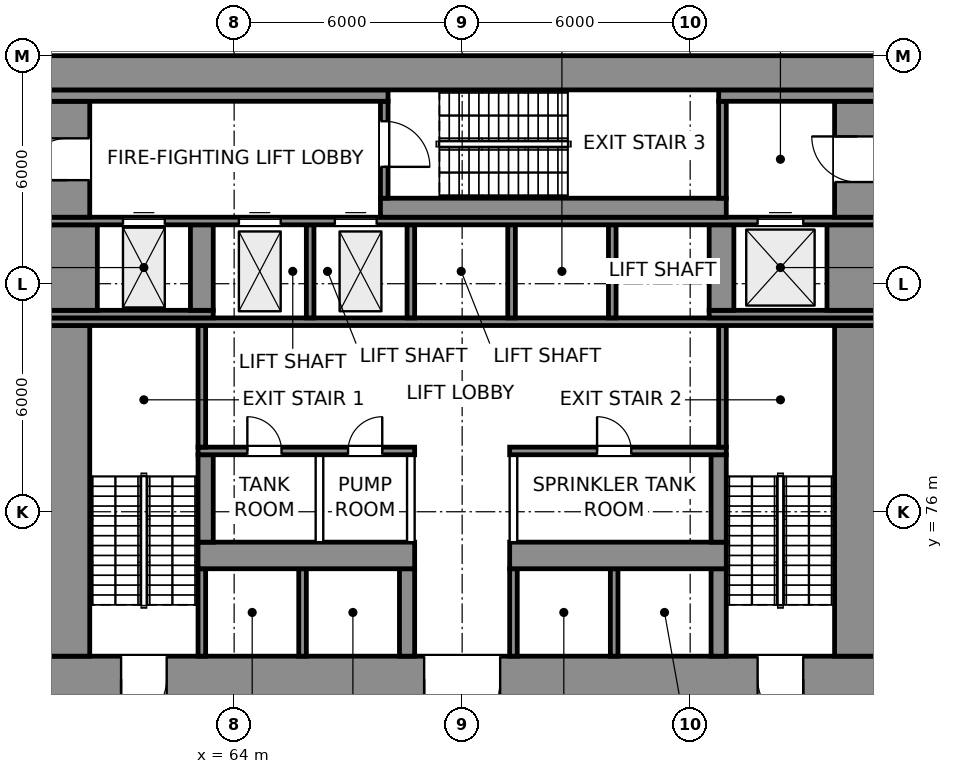
"""IFC4 building model, lengths in metres.
Left out: names, types, materials, properties, quantities, classifications, styles, units other than length and angle.
Written with IfcOpenShell. Run it as: python <this file> out.ifc"""

import sys

from ifc_helpers import new_model, si_unit, direction, frame, frame_2d, origin, place, context, subcontext, project, spatial, rectangle, extrude, element, fill, save


model = new_model("IFC4")
c1 = context("Model", 3, precision=1e-05, world=origin(), true_north=direction((0.0, 1.0)))
c2 = subcontext(c1, "Body", "Model", "MODEL_VIEW")
j1 = project(units=[si_unit("LENGTHUNIT", "METRE"), si_unit("PLANEANGLEUNIT", "RADIAN")], contexts=[c1])
p1 = place(None, origin())
s1 = spatial("IfcSite", under=j1, at=p1, CompositionType="ELEMENT")
p2 = place(p1, origin())
s2 = spatial("IfcBuilding", under=s1, at=p2, CompositionType="ELEMENT")
p3 = place(p2, frame((0.0, 0.0, -5.0)))
s3 = spatial("IfcBuildingStorey", under=s2, at=p3, CompositionType="ELEMENT", Elevation=-5.0)
p4 = place(p3, frame((59.0, 71.6, 0.0), z_axis=(0.0, 0.0, 1.0), x_axis=(1.0, 0.0, 0.0)))
e1 = element("IfcWall", 1, at=p4, inside=s3, PredefinedType="SHEAR", context=c2, shape_type="SweptSolid", body=[
    extrude(rectangle(XDim=22.0, YDim=1.2, at=frame_2d((11.0, 0.0))), origin(), (0.0, 0.0, 1.0), 5.0),
])
p5 = place(p4, frame((2.025, 0.0, 0.0)))
e2 = element("IfcOpeningElement", 2, at=p5, cuts=e1, PredefinedType="OPENING", context=c2, shape_type="SweptSolid", body=[
    extrude(rectangle(XDim=1.2, YDim=2.1, at=frame_2d((0.6, 1.05))), frame((0.0, 0.61, 0.0), z_axis=(0.0, -1.0, 0.0), x_axis=(1.0, 0.0, 0.0)), (0.0, 0.0, 1.0), 1.22),
])
p6 = place(p4, frame((18.775, 0.0, 0.0)))
e3 = element("IfcOpeningElement", 3, at=p6, cuts=e1, PredefinedType="OPENING", context=c2, shape_type="SweptSolid", body=[
    extrude(rectangle(XDim=1.2, YDim=2.1, at=frame_2d((0.6, 1.05))), frame((0.0, 0.61, 0.0), z_axis=(0.0, -1.0, 0.0), x_axis=(1.0, 0.0, 0.0)), (0.0, 0.0, 1.0), 1.22),
])
p7 = place(p4, frame((10.0, 0.0, 0.0)))
e4 = element("IfcOpeningElement", 4, at=p7, cuts=e1, PredefinedType="OPENING", context=c2, shape_type="SweptSolid", body=[
    extrude(rectangle(XDim=2.0, YDim=2.1, at=frame_2d((1.0, 1.05))), frame((0.0, 0.61, 0.0), z_axis=(0.0, -1.0, 0.0), x_axis=(1.0, 0.0, 0.0)), (0.0, 0.0, 1.0), 1.22),
])
p8 = place(p3, frame((59.6, 72.2, 0.0), z_axis=(0.0, 0.0, 1.0), x_axis=(0.0, 1.0, 0.0)))
e5 = element("IfcWall", 5, at=p8, inside=s3, PredefinedType="SHEAR", context=c2, shape_type="SweptSolid", body=[
    extrude(rectangle(XDim=8.7, YDim=1.2, at=frame_2d((4.35, 0.0))), origin(), (0.0, 0.0, 1.0), 5.0),
])
for number, where, z_axis, x_axis in (
    (6, (63.15, 72.2, 0.0), (0.0, 0.0, 1.0), (0.0, 1.0, 0.0)),
    (7, (65.8, 72.2, 0.0), (0.0, 0.0, 1.0), (0.0, 1.0, 0.0)),
):
    element("IfcWall", number, at=place(p3, frame(where, z_axis=z_axis, x_axis=x_axis)), inside=s3, PredefinedType="SHEAR", context=c2, shape_type="SweptSolid", body=[
        extrude(rectangle(XDim=2.3, YDim=0.2, at=frame_2d((1.15, 0.0))), origin(), (0.0, 0.0, 1.0), 5.0),
    ])
p9 = place(p3, frame((68.55, 72.2, 0.0), z_axis=(0.0, 0.0, 1.0), x_axis=(0.0, 1.0, 0.0)))
e8 = element("IfcWall", 8, at=p9, inside=s3, PredefinedType="SHEAR", context=c2, shape_type="SweptSolid", body=[
    extrude(rectangle(XDim=2.3, YDim=0.4, at=frame_2d((1.15, 0.0))), origin(), (0.0, 0.0, 1.0), 5.0),
])
for number, where, z_axis, x_axis in (
    (9, (71.35, 72.2, 0.0), (0.0, 0.0, 1.0), (0.0, 1.0, 0.0)),
    (10, (74.0, 72.2, 0.0), (0.0, 0.0, 1.0), (0.0, 1.0, 0.0)),
):
    element("IfcWall", number, at=place(p3, frame(where, z_axis=z_axis, x_axis=x_axis)), inside=s3, PredefinedType="SHEAR", context=c2, shape_type="SweptSolid", body=[
        extrude(rectangle(XDim=2.3, YDim=0.2, at=frame_2d((1.15, 0.0))), origin(), (0.0, 0.0, 1.0), 5.0),
    ])
p10 = place(p3, frame((76.75, 72.2, 0.0), z_axis=(0.0, 0.0, 1.0), x_axis=(0.0, 1.0, 0.0)))
e11 = element("IfcWall", 11, at=p10, inside=s3, PredefinedType="SHEAR", context=c2, shape_type="SweptSolid", body=[
    extrude(rectangle(XDim=2.3, YDim=0.4, at=frame_2d((1.15, 0.0))), origin(), (0.0, 0.0, 1.0), 5.0),
])
p11 = place(p3, frame((80.4, 72.2, 0.0), z_axis=(0.0, 0.0, 1.0), x_axis=(0.0, 1.0, 0.0)))
e12 = element("IfcWall", 12, at=p11, inside=s3, PredefinedType="SHEAR", context=c2, shape_type="SweptSolid", body=[
    extrude(rectangle(XDim=8.7, YDim=1.2, at=frame_2d((4.35, 0.0))), origin(), (0.0, 0.0, 1.0), 5.0),
])
for number, where, z_axis, x_axis in (
    (13, (63.05, 74.85, 0.0), (0.0, 0.0, 1.0), (1.0, 0.0, 0.0)),
    (14, (71.25, 74.85, 0.0), (0.0, 0.0, 1.0), (1.0, 0.0, 0.0)),
):
    element("IfcWall", number, at=place(p3, frame(where, z_axis=z_axis, x_axis=x_axis)), inside=s3, PredefinedType="SHEAR", context=c2, shape_type="SweptSolid", body=[
        extrude(rectangle(XDim=5.7, YDim=0.7, at=frame_2d((2.85, 0.0))), origin(), (0.0, 0.0, 1.0), 5.0),
    ])
p12 = place(p3, frame((63.25, 75.2, 0.0), z_axis=(0.0, 0.0, 1.0), x_axis=(0.0, 1.0, 0.0)))
e15 = element("IfcWall", 15, at=p12, inside=s3, PredefinedType="SHEAR", context=c2, shape_type="SweptSolid", body=[
    extrude(rectangle(XDim=2.3, YDim=0.4, at=frame_2d((1.15, 0.0))), origin(), (0.0, 0.0, 1.0), 5.0),
])
for number, where, z_axis, x_axis in (
    (16, (66.245, 75.2, 0.0), (0.0, 0.0, 1.0), (0.0, 1.0, 0.0)),
    (17, (68.65, 75.2, 0.0), (0.0, 0.0, 1.0), (0.0, 1.0, 0.0)),
    (18, (71.35, 75.2, 0.0), (0.0, 0.0, 1.0), (0.0, 1.0, 0.0)),
):
    element("IfcWall", number, at=place(p3, frame(where, z_axis=z_axis, x_axis=x_axis)), inside=s3, PredefinedType="PARTITIONING", context=c2, shape_type="SweptSolid", body=[
        extrude(rectangle(XDim=2.3, YDim=0.2, at=frame_2d((1.15, 0.0))), origin(), (0.0, 0.0, 1.0), 4.55),
    ])
p13 = place(p3, frame((76.75, 75.2, 0.0), z_axis=(0.0, 0.0, 1.0), x_axis=(0.0, 1.0, 0.0)))
e19 = element("IfcWall", 19, at=p13, inside=s3, PredefinedType="SHEAR", context=c2, shape_type="SweptSolid", body=[
    extrude(rectangle(XDim=2.3, YDim=0.4, at=frame_2d((1.15, 0.0))), origin(), (0.0, 0.0, 1.0), 5.0),
])
p14 = place(p3, frame((63.05, 77.6, 0.0), z_axis=(0.0, 0.0, 1.0), x_axis=(1.0, 0.0, 0.0)))
e20 = element("IfcWall", 20, at=p14, inside=s3, PredefinedType="SHEAR", context=c2, shape_type="SweptSolid", body=[
    extrude(rectangle(XDim=5.7, YDim=0.2, at=frame_2d((2.85, 0.0))), origin(), (0.0, 0.0, 1.0), 5.0),
])
p15 = place(p14, frame((1.298, 0.0, 0.0)))
e21 = element("IfcOpeningElement", 21, at=p15, cuts=e20, PredefinedType="OPENING", context=c2, shape_type="SweptSolid", body=[
    extrude(rectangle(XDim=0.9, YDim=2.1, at=frame_2d((0.45, 1.05))), frame((0.0, 0.11, 0.0), z_axis=(0.0, -1.0, 0.0), x_axis=(1.0, 0.0, 0.0)), (0.0, 0.0, 1.0), 0.22),
])
p16 = place(p14, frame((3.948, 0.0, 0.0)))
e22 = element("IfcOpeningElement", 22, at=p16, cuts=e20, PredefinedType="OPENING", context=c2, shape_type="SweptSolid", body=[
    extrude(rectangle(XDim=0.9, YDim=2.1, at=frame_2d((0.45, 1.05))), frame((0.0, 0.11, 0.0), z_axis=(0.0, -1.0, 0.0), x_axis=(1.0, 0.0, 0.0)), (0.0, 0.0, 1.0), 0.22),
])
p17 = place(p3, frame((71.25, 77.6, 0.0), z_axis=(0.0, 0.0, 1.0), x_axis=(1.0, 0.0, 0.0)))
e23 = element("IfcWall", 23, at=p17, inside=s3, PredefinedType="SHEAR", context=c2, shape_type="SweptSolid", body=[
    extrude(rectangle(XDim=5.7, YDim=0.2, at=frame_2d((2.85, 0.0))), origin(), (0.0, 0.0, 1.0), 5.0),
])
p18 = place(p17, frame((2.3, 0.0, 0.0)))
e24 = element("IfcOpeningElement", 24, at=p18, cuts=e23, PredefinedType="OPENING", context=c2, shape_type="SweptSolid", body=[
    extrude(rectangle(XDim=0.9, YDim=2.1, at=frame_2d((0.45, 1.05))), frame((0.0, 0.11, 0.0), z_axis=(0.0, -1.0, 0.0), x_axis=(1.0, 0.0, 0.0)), (0.0, 0.0, 1.0), 0.22),
])
for number, where, z_axis, x_axis in (
    (25, (63.15, 77.7, 0.0), (0.0, 0.0, 1.0), (0.0, 1.0, 0.0)),
    (26, (76.85, 77.7, 0.0), (0.0, 0.0, 1.0), (0.0, 1.0, 0.0)),
):
    element("IfcWall", number, at=place(p3, frame(where, z_axis=z_axis, x_axis=x_axis)), inside=s3, PredefinedType="SHEAR", context=c2, shape_type="SweptSolid", body=[
        extrude(rectangle(XDim=3.2, YDim=0.2, at=frame_2d((1.6, 0.0))), origin(), (0.0, 0.0, 1.0), 5.0),
    ])
p19 = place(p3, frame((59.0, 81.0, 0.0), z_axis=(0.0, 0.0, 1.0), x_axis=(1.0, 0.0, 0.0)))
e27 = element("IfcWall", 27, at=p19, inside=s3, PredefinedType="SHEAR", context=c2, shape_type="SweptSolid", body=[
    extrude(rectangle(XDim=22.0, YDim=0.2, at=frame_2d((11.0, 0.0))), origin(), (0.0, 0.0, 1.0), 5.0),
])
p20 = place(p3, frame((59.0, 81.2, 0.0), z_axis=(0.0, 0.0, 1.0), x_axis=(1.0, 0.0, 0.0)))
e28 = element("IfcWall", 28, at=p20, inside=s3, PredefinedType="SHEAR", context=c2, shape_type="SweptSolid", body=[
    extrude(rectangle(XDim=4.45, YDim=0.2, at=frame_2d((2.225, 0.0))), origin(), (0.0, 0.0, 1.0), 5.0),
])
for number, where, z_axis, x_axis in (
    (29, (66.0, 81.1, 0.0), (0.0, 0.0, 1.0), (0.0, 1.0, 0.0)),
    (30, (68.65, 81.1, 0.0), (0.0, 0.0, 1.0), (0.0, 1.0, 0.0)),
    (31, (71.3, 81.1, 0.0), (0.0, 0.0, 1.0), (0.0, 1.0, 0.0)),
    (32, (73.95, 81.1, 0.0), (0.0, 0.0, 1.0), (0.0, 1.0, 0.0)),
):
    element("IfcWall", number, at=place(p3, frame(where, z_axis=z_axis, x_axis=x_axis)), inside=s3, PredefinedType="SHEAR", context=c2, shape_type="SweptSolid", body=[
        extrude(rectangle(XDim=2.45, YDim=0.2, at=frame_2d((1.225, 0.0))), origin(), (0.0, 0.0, 1.0), 5.0),
    ])
p21 = place(p3, frame((76.5, 81.2, 0.0), z_axis=(0.0, 0.0, 1.0), x_axis=(1.0, 0.0, 0.0)))
e33 = element("IfcWall", 33, at=p21, inside=s3, PredefinedType="SHEAR", context=c2, shape_type="SweptSolid", body=[
    extrude(rectangle(XDim=4.5, YDim=0.2, at=frame_2d((2.25, 0.0))), origin(), (0.0, 0.0, 1.0), 5.0),
])
p22 = place(p3, frame((59.7, 81.3, 0.0), z_axis=(0.0, 0.0, 1.0), x_axis=(0.0, 1.0, 0.0)))
e34 = element("IfcWall", 34, at=p22, inside=s3, PredefinedType="SHEAR", context=c2, shape_type="SweptSolid", body=[
    extrude(rectangle(XDim=2.25, YDim=1.4, at=frame_2d((1.125, 0.0))), origin(), (0.0, 0.0, 1.0), 5.0),
])
p23 = place(p3, frame((63.15, 81.3, 0.0), z_axis=(0.0, 0.0, 1.0), x_axis=(0.0, 1.0, 0.0)))
e35 = element("IfcWall", 35, at=p23, inside=s3, PredefinedType="SHEAR", context=c2, shape_type="SweptSolid", body=[
    extrude(rectangle(XDim=2.25, YDim=0.6, at=frame_2d((1.125, 0.0))), origin(), (0.0, 0.0, 1.0), 5.0),
])
p24 = place(p3, frame((76.825, 81.3, 0.0), z_axis=(0.0, 0.0, 1.0), x_axis=(0.0, 1.0, 0.0)))
e36 = element("IfcWall", 36, at=p24, inside=s3, PredefinedType="SHEAR", context=c2, shape_type="SweptSolid", body=[
    extrude(rectangle(XDim=2.25, YDim=0.65, at=frame_2d((1.125, 0.0))), origin(), (0.0, 0.0, 1.0), 5.0),
])
p25 = place(p3, frame((80.3, 81.3, 0.0), z_axis=(0.0, 0.0, 1.0), x_axis=(0.0, 1.0, 0.0)))
e37 = element("IfcWall", 37, at=p25, inside=s3, PredefinedType="SHEAR", context=c2, shape_type="SweptSolid", body=[
    extrude(rectangle(XDim=2.25, YDim=1.4, at=frame_2d((1.125, 0.0))), origin(), (0.0, 0.0, 1.0), 5.0),
])
p26 = place(p3, frame((59.0, 83.65, 0.0), z_axis=(0.0, 0.0, 1.0), x_axis=(1.0, 0.0, 0.0)))
e38 = element("IfcWall", 38, at=p26, inside=s3, PredefinedType="SHEAR", context=c2, shape_type="SweptSolid", body=[
    extrude(rectangle(XDim=22.0, YDim=0.2, at=frame_2d((11.0, 0.0))), origin(), (0.0, 0.0, 1.0), 5.0),
])
p27 = place(p26, frame((5.125, 0.0, 0.0)))
e39 = element("IfcOpeningElement", 39, at=p27, cuts=e38, PredefinedType="OPENING", context=c2, shape_type="SweptSolid", body=[
    extrude(rectangle(XDim=1.1, YDim=2.1, at=frame_2d((0.55, 1.05))), frame((0.0, 0.11, 0.0), z_axis=(0.0, -1.0, 0.0), x_axis=(1.0, 0.0, 0.0)), (0.0, 0.0, 1.0), 0.22),
])
p28 = place(p26, frame((7.65, 0.0, 0.0)))
e40 = element("IfcOpeningElement", 40, at=p28, cuts=e38, PredefinedType="OPENING", context=c2, shape_type="SweptSolid", body=[
    extrude(rectangle(XDim=1.1, YDim=2.1, at=frame_2d((0.55, 1.05))), frame((0.0, 0.11, 0.0), z_axis=(0.0, -1.0, 0.0), x_axis=(1.0, 0.0, 0.0)), (0.0, 0.0, 1.0), 0.22),
])
p29 = place(p26, frame((18.775, 0.0, 0.0)))
e41 = element("IfcOpeningElement", 41, at=p29, cuts=e38, PredefinedType="OPENING", context=c2, shape_type="SweptSolid", body=[
    extrude(rectangle(XDim=1.2, YDim=2.1, at=frame_2d((0.6, 1.05))), frame((0.0, 0.11, 0.0), z_axis=(0.0, -1.0, 0.0), x_axis=(1.0, 0.0, 0.0)), (0.0, 0.0, 1.0), 0.22),
])
p30 = place(p26, frame((2.075, 0.0, 0.0)))
e42 = element("IfcOpeningElement", 42, at=p30, cuts=e38, PredefinedType="OPENING", context=c2, shape_type="SweptSolid", body=[
    extrude(rectangle(XDim=1.1, YDim=2.1, at=frame_2d((0.55, 1.05))), frame((0.0, 0.11, 0.0), z_axis=(0.0, -1.0, 0.0), x_axis=(1.0, 0.0, 0.0)), (0.0, 0.0, 1.0), 0.22),
])
p31 = place(p3, frame((59.6, 83.75, 0.0), z_axis=(0.0, 0.0, 1.0), x_axis=(0.0, 1.0, 0.0)))
e43 = element("IfcWall", 43, at=p31, inside=s3, PredefinedType="SHEAR", context=c2, shape_type="SweptSolid", body=[
    extrude(rectangle(XDim=3.05, YDim=1.2, at=frame_2d((1.525, 0.0))), origin(), (0.0, 0.0, 1.0), 5.0),
])
p32 = place(p31, frame((0.975, 0.0, 0.0)))
e44 = element("IfcOpeningElement", 44, at=p32, cuts=e43, PredefinedType="OPENING", context=c2, shape_type="SweptSolid", body=[
    extrude(rectangle(XDim=1.1, YDim=2.1, at=frame_2d((0.55, 1.05))), frame((0.0, 0.61, 0.0), z_axis=(0.0, -1.0, 0.0), x_axis=(1.0, 0.0, 0.0)), (0.0, 0.0, 1.0), 1.22),
])
p33 = place(p3, frame((67.85, 84.0, 0.0), z_axis=(0.0, 0.0, 1.0), x_axis=(1.0, 0.0, 0.0)))
e45 = element("IfcWall", 45, at=p33, inside=s3, PredefinedType="SHEAR", context=c2, shape_type="SweptSolid", body=[
    extrude(rectangle(XDim=9.1, YDim=0.5, at=frame_2d((4.55, 0.0))), origin(), (0.0, 0.0, 1.0), 5.0),
])
p34 = place(p3, frame((80.4, 83.75, 0.0), z_axis=(0.0, 0.0, 1.0), x_axis=(0.0, 1.0, 0.0)))
e46 = element("IfcWall", 46, at=p34, inside=s3, PredefinedType="SHEAR", context=c2, shape_type="SweptSolid", body=[
    extrude(rectangle(XDim=3.05, YDim=1.2, at=frame_2d((1.525, 0.0))), origin(), (0.0, 0.0, 1.0), 5.0),
])
p35 = place(p34, frame((0.925, 0.0, 0.0)))
e47 = element("IfcOpeningElement", 47, at=p35, cuts=e46, PredefinedType="OPENING", context=c2, shape_type="SweptSolid", body=[
    extrude(rectangle(XDim=1.2, YDim=2.1, at=frame_2d((0.6, 1.05))), frame((0.0, 0.61, 0.0), z_axis=(0.0, -1.0, 0.0), x_axis=(1.0, 0.0, 0.0)), (0.0, 0.0, 1.0), 1.22),
])
p36 = place(p3, frame((67.95, 84.25, 0.0), z_axis=(0.0, 0.0, 1.0), x_axis=(0.0, 1.0, 0.0)))
e48 = element("IfcWall", 48, at=p36, inside=s3, PredefinedType="SHEAR", context=c2, shape_type="SweptSolid", body=[
    extrude(rectangle(XDim=2.55, YDim=0.2, at=frame_2d((1.275, 0.0))), origin(), (0.0, 0.0, 1.0), 5.0),
])
p37 = place(p36, frame((0.825, 0.0, 0.0)))
e49 = element("IfcOpeningElement", 49, at=p37, cuts=e48, PredefinedType="OPENING", context=c2, shape_type="SweptSolid", body=[
    extrude(rectangle(XDim=1.2, YDim=2.1, at=frame_2d((0.6, 1.05))), frame((0.0, 0.11, 0.0), z_axis=(0.0, -1.0, 0.0), x_axis=(1.0, 0.0, 0.0)), (0.0, 0.0, 1.0), 0.22),
])
p38 = place(p3, frame((76.85, 84.25, 0.0), z_axis=(0.0, 0.0, 1.0), x_axis=(0.0, 1.0, 0.0)))
e50 = element("IfcWall", 50, at=p38, inside=s3, PredefinedType="SHEAR", context=c2, shape_type="SweptSolid", body=[
    extrude(rectangle(XDim=2.55, YDim=0.2, at=frame_2d((1.275, 0.0))), origin(), (0.0, 0.0, 1.0), 5.0),
])
p39 = place(p3, frame((59.0, 86.95, 0.0), z_axis=(0.0, 0.0, 1.0), x_axis=(1.0, 0.0, 0.0)))
e51 = element("IfcWall", 51, at=p39, inside=s3, PredefinedType="SHEAR", context=c2, shape_type="SweptSolid", body=[
    extrude(rectangle(XDim=9.05, YDim=0.3, at=frame_2d((4.525, 0.0))), origin(), (0.0, 0.0, 1.0), 5.0),
])
p40 = place(p3, frame((76.75, 86.95, 0.0), z_axis=(0.0, 0.0, 1.0), x_axis=(1.0, 0.0, 0.0)))
e52 = element("IfcWall", 52, at=p40, inside=s3, PredefinedType="SHEAR", context=c2, shape_type="SweptSolid", body=[
    extrude(rectangle(XDim=4.25, YDim=0.3, at=frame_2d((2.125, 0.0))), origin(), (0.0, 0.0, 1.0), 5.0),
])
p41 = place(p3, frame((59.0, 87.55, 0.0), z_axis=(0.0, 0.0, 1.0), x_axis=(1.0, 0.0, 0.0)))
e53 = element("IfcWall", 53, at=p41, inside=s3, PredefinedType="SHEAR", context=c2, shape_type="SweptSolid", body=[
    extrude(rectangle(XDim=22.0, YDim=0.9, at=frame_2d((11.0, 0.0))), origin(), (0.0, 0.0, 1.0), 5.0),
])
p42 = place(p5, frame((1.2, 0.0, 0.0), z_axis=(0.0, 0.0, 1.0), x_axis=(-1.0, 0.0, 0.0)))
e54 = element("IfcDoor", 54, at=p42, inside=s3, OperationType="SINGLE_SWING_RIGHT", PredefinedType="DOOR", context=c2, shape_type="SweptSolid", body=[
    extrude(rectangle(XDim=1.2, YDim=2.1, at=frame_2d((0.6, 1.05))), frame((0.0, 0.025, 0.0), z_axis=(0.0, -1.0, 0.0), x_axis=(1.0, 0.0, 0.0)), (0.0, 0.0, 1.0), 0.05),
])
fill(e2, e54)
p43 = place(p6, frame((1.2, 0.0, 0.0), z_axis=(0.0, 0.0, 1.0), x_axis=(-1.0, 0.0, 0.0)))
e55 = element("IfcDoor", 55, at=p43, inside=s3, OperationType="SINGLE_SWING_LEFT", PredefinedType="DOOR", context=c2, shape_type="SweptSolid", body=[
    extrude(rectangle(XDim=1.2, YDim=2.1, at=frame_2d((0.6, 1.05))), frame((0.0, 0.025, 0.0), z_axis=(0.0, -1.0, 0.0), x_axis=(1.0, 0.0, 0.0)), (0.0, 0.0, 1.0), 0.05),
])
fill(e3, e55)
p44 = place(p37, frame((1.2, 0.0, 0.0), z_axis=(0.0, 0.0, 1.0), x_axis=(-1.0, 0.0, 0.0)))
e56 = element("IfcDoor", 56, at=p44, inside=s3, OperationType="SINGLE_SWING_RIGHT", PredefinedType="DOOR", context=c2, shape_type="SweptSolid", body=[
    extrude(rectangle(XDim=1.2, YDim=2.1, at=frame_2d((0.6, 1.05))), frame((0.0, 0.025, 0.0), z_axis=(0.0, -1.0, 0.0), x_axis=(1.0, 0.0, 0.0)), (0.0, 0.0, 1.0), 0.05),
])
fill(e49, e56)
p45 = place(p7, frame((2.0, 0.0, 0.0), z_axis=(0.0, 0.0, 1.0), x_axis=(-1.0, 0.0, 0.0)))
e57 = element("IfcDoor", 57, at=p45, inside=s3, OperationType="DOUBLE_DOOR_SINGLE_SWING", PredefinedType="DOOR", context=c2, shape_type="SweptSolid", body=[
    extrude(rectangle(XDim=2.0, YDim=2.1, at=frame_2d((1.0, 1.05))), frame((0.0, 0.025, 0.0), z_axis=(0.0, -1.0, 0.0), x_axis=(1.0, 0.0, 0.0)), (0.0, 0.0, 1.0), 0.05),
])
fill(e4, e57)
p46 = place(p32, origin())
e58 = element("IfcDoor", 58, at=p46, inside=s3, OperationType="SINGLE_SWING_LEFT", PredefinedType="DOOR", context=c2, shape_type="SweptSolid", body=[
    extrude(rectangle(XDim=1.1, YDim=2.1, at=frame_2d((0.55, 1.05))), frame((0.0, 0.025, 0.0), z_axis=(0.0, -1.0, 0.0), x_axis=(1.0, 0.0, 0.0)), (0.0, 0.0, 1.0), 0.05),
])
fill(e44, e58)
p47 = place(p35, origin())
e59 = element("IfcDoor", 59, at=p47, inside=s3, OperationType="SINGLE_SWING_RIGHT", PredefinedType="DOOR", context=c2, shape_type="SweptSolid", body=[
    extrude(rectangle(XDim=1.2, YDim=2.1, at=frame_2d((0.6, 1.05))), frame((0.0, 0.025, 0.0), z_axis=(0.0, -1.0, 0.0), x_axis=(1.0, 0.0, 0.0)), (0.0, 0.0, 1.0), 0.05),
])
fill(e47, e59)
p48 = place(p27, origin())
e60 = element("IfcDoor", 60, at=p48, inside=s3, OperationType="DOUBLE_DOOR_SLIDING", PredefinedType="DOOR", context=c2, shape_type="SweptSolid", body=[
    extrude(rectangle(XDim=1.1, YDim=2.1, at=frame_2d((0.55, 1.05))), frame((0.0, 0.025, 0.0), z_axis=(0.0, -1.0, 0.0), x_axis=(1.0, 0.0, 0.0)), (0.0, 0.0, 1.0), 0.05),
])
fill(e39, e60)
p49 = place(p28, origin())
e61 = element("IfcDoor", 61, at=p49, inside=s3, OperationType="DOUBLE_DOOR_SLIDING", PredefinedType="DOOR", context=c2, shape_type="SweptSolid", body=[
    extrude(rectangle(XDim=1.1, YDim=2.1, at=frame_2d((0.55, 1.05))), frame((0.0, 0.025, 0.0), z_axis=(0.0, -1.0, 0.0), x_axis=(1.0, 0.0, 0.0)), (0.0, 0.0, 1.0), 0.05),
])
fill(e40, e61)
p50 = place(p29, origin())
e62 = element("IfcDoor", 62, at=p50, inside=s3, OperationType="DOUBLE_DOOR_SLIDING", PredefinedType="DOOR", context=c2, shape_type="SweptSolid", body=[
    extrude(rectangle(XDim=1.2, YDim=2.1, at=frame_2d((0.6, 1.05))), frame((0.0, 0.025, 0.0), z_axis=(0.0, -1.0, 0.0), x_axis=(1.0, 0.0, 0.0)), (0.0, 0.0, 1.0), 0.05),
])
fill(e41, e62)
p51 = place(p30, origin())
e63 = element("IfcDoor", 63, at=p51, inside=s3, OperationType="DOUBLE_DOOR_SLIDING", PredefinedType="DOOR", context=c2, shape_type="SweptSolid", body=[
    extrude(rectangle(XDim=1.1, YDim=2.1, at=frame_2d((0.55, 1.05))), frame((0.0, 0.025, 0.0), z_axis=(0.0, -1.0, 0.0), x_axis=(1.0, 0.0, 0.0)), (0.0, 0.0, 1.0), 0.05),
])
fill(e42, e63)
p52 = place(p15, origin())
e64 = element("IfcDoor", 64, at=p52, inside=s3, OperationType="SINGLE_SWING_LEFT", PredefinedType="DOOR", context=c2, shape_type="SweptSolid", body=[
    extrude(rectangle(XDim=0.9, YDim=2.1, at=frame_2d((0.45, 1.05))), frame((0.0, 0.025, 0.0), z_axis=(0.0, -1.0, 0.0), x_axis=(1.0, 0.0, 0.0)), (0.0, 0.0, 1.0), 0.05),
])
fill(e21, e64)
p53 = place(p16, origin())
e65 = element("IfcDoor", 65, at=p53, inside=s3, OperationType="SINGLE_SWING_RIGHT", PredefinedType="DOOR", context=c2, shape_type="SweptSolid", body=[
    extrude(rectangle(XDim=0.9, YDim=2.1, at=frame_2d((0.45, 1.05))), frame((0.0, 0.025, 0.0), z_axis=(0.0, -1.0, 0.0), x_axis=(1.0, 0.0, 0.0)), (0.0, 0.0, 1.0), 0.05),
])
fill(e22, e65)
p54 = place(p18, origin())
e66 = element("IfcDoor", 66, at=p54, inside=s3, OperationType="SINGLE_SWING_LEFT", PredefinedType="DOOR", context=c2, shape_type="SweptSolid", body=[
    extrude(rectangle(XDim=0.9, YDim=2.1, at=frame_2d((0.45, 1.05))), frame((0.0, 0.025, 0.0), z_axis=(0.0, -1.0, 0.0), x_axis=(1.0, 0.0, 0.0)), (0.0, 0.0, 1.0), 0.05),
])
fill(e24, e66)
save(model, sys.argv[1])
